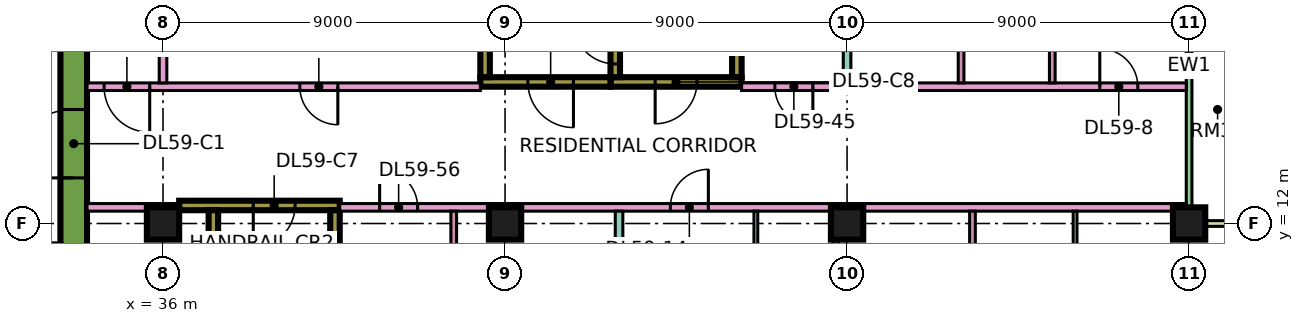
"""IFC4 building model, lengths in metres.
Left out: names, types, materials, properties, quantities, classifications, styles, units other than length and angle.
Written with IfcOpenShell. Run it as: python <this file> out.ifc"""

import sys

from ifc_helpers import new_model, si_unit, direction, frame, frame_2d, origin, origin_2d, place, context, subcontext, project, spatial, rectangle, extrude, element, fill, save


model = new_model("IFC4")
c1 = context("Model", 3, precision=1e-05, world=origin(), true_north=direction((0.0, 1.0)))
c2 = subcontext(c1, "Body", "Model", "MODEL_VIEW")
j1 = project(units=[si_unit("LENGTHUNIT", "METRE"), si_unit("PLANEANGLEUNIT", "RADIAN")], contexts=[c1])
p1 = place(None, origin())
s1 = spatial("IfcSite", under=j1, at=p1, CompositionType="ELEMENT")
p2 = place(p1, origin())
s2 = spatial("IfcBuilding", under=s1, at=p2, CompositionType="ELEMENT")
p3 = place(p2, frame((0.0, 0.0, 249.15)))
s3 = spatial("IfcBuildingStorey", under=s2, at=p3, CompositionType="ELEMENT", Elevation=249.15)
for number, where, z_axis, x_axis in (
    (1, (36.0, 12.0, 0.0), (0.0, 0.0, 1.0), (1.0, 0.0, 0.0)),
    (2, (45.0, 12.0, 0.0), (0.0, 0.0, 1.0), (1.0, 0.0, 0.0)),
    (3, (54.0, 12.0, 0.0), (0.0, 0.0, 1.0), (1.0, 0.0, 0.0)),
    (4, (63.0, 12.0, 0.0), (0.0, 0.0, 1.0), (1.0, 0.0, 0.0)),
):
    element("IfcColumn", number, at=place(p3, frame(where, z_axis=z_axis, x_axis=x_axis)), inside=s3, PredefinedType="COLUMN", context=c2, shape_type="SweptSolid", body=[
        extrude(rectangle(XDim=0.85, YDim=0.85, at=origin_2d()), origin(), (0.0, 0.0, 1.0), 3.75),
    ])
p4 = place(p3, frame((33.65, 7.7, 0.0), z_axis=(0.0, 0.0, 1.0), x_axis=(0.0, 1.0, 0.0)))
e5 = element("IfcWall", 5, at=p4, inside=s3, PredefinedType="SHEAR", context=c2, shape_type="SweptSolid", body=[
    extrude(rectangle(XDim=11.6, YDim=0.7, at=frame_2d((5.8, 0.0))), origin(), (0.0, 0.0, 1.0), 3.75),
])
p5 = place(p4, frame((5.5, 0.0, 0.0)))
e6 = element("IfcOpeningElement", 6, at=p5, cuts=e5, PredefinedType="OPENING", context=c2, shape_type="SweptSolid", body=[
    extrude(rectangle(XDim=1.8, YDim=2.4, at=frame_2d((0.9, 1.2))), frame((0.0, 0.36, 0.0), z_axis=(0.0, -1.0, 0.0), x_axis=(1.0, 0.0, 0.0)), (0.0, 0.0, 1.0), 0.72),
])
p6 = place(p3, frame((36.425, 12.475, 0.0), z_axis=(0.0, 0.0, 1.0), x_axis=(1.0, 0.0, 0.0)))
e7 = element("IfcWall", 7, at=p6, inside=s3, PredefinedType="SHEAR", context=c2, shape_type="SweptSolid", body=[
    extrude(rectangle(XDim=4.225, YDim=0.25, at=frame_2d((2.112, 0.0))), origin(), (0.0, 0.0, 1.0), 3.75),
])
p7 = place(p6, frame((1.95, 0.0, 0.0)))
e8 = element("IfcOpeningElement", 8, at=p7, cuts=e7, PredefinedType="OPENING", context=c2, shape_type="SweptSolid", body=[
    extrude(rectangle(XDim=1.1, YDim=2.2, at=frame_2d((0.55, 1.1))), frame((0.0, 0.135, 0.0), z_axis=(0.0, -1.0, 0.0), x_axis=(1.0, 0.0, 0.0)), (0.0, 0.0, 1.0), 0.27),
])
for number, where, z_axis, x_axis in (
    (9, (37.325, 5.85, 0.0), (0.0, 0.0, 1.0), (0.0, 1.0, 0.0)),
    (10, (40.525, 5.85, 0.0), (0.0, 0.0, 1.0), (0.0, 1.0, 0.0)),
):
    element("IfcWall", number, at=place(p3, frame(where, z_axis=z_axis, x_axis=x_axis)), inside=s3, PredefinedType="SHEAR", context=c2, shape_type="SweptSolid", body=[
        extrude(rectangle(XDim=6.5, YDim=0.25, at=frame_2d((3.25, 0.0))), origin(), (0.0, 0.0, 1.0), 3.75),
    ])
p8 = place(p3, frame((47.775, 15.725, 0.0), z_axis=(0.0, 0.0, 1.0), x_axis=(1.0, 0.0, 0.0)))
e11 = element("IfcWall", 11, at=p8, inside=s3, PredefinedType="SHEAR", context=c2, shape_type="SweptSolid", body=[
    extrude(rectangle(XDim=3.45, YDim=0.25, at=frame_2d((1.725, 0.0))), origin(), (0.0, 0.0, 1.0), 3.75),
])
p9 = place(p8, frame((1.175, 0.0, 0.0)))
e12 = element("IfcOpeningElement", 12, at=p9, cuts=e11, PredefinedType="OPENING", context=c2, shape_type="SweptSolid", body=[
    extrude(rectangle(XDim=1.1, YDim=2.2, at=frame_2d((0.55, 1.1))), frame((0.0, 0.135, 0.0), z_axis=(0.0, -1.0, 0.0), x_axis=(1.0, 0.0, 0.0)), (0.0, 0.0, 1.0), 0.27),
])
p10 = place(p3, frame((47.9, 15.85, 0.0), z_axis=(0.0, 0.0, 1.0), x_axis=(0.0, 1.0, 0.0)))
e13 = element("IfcWall", 13, at=p10, inside=s3, PredefinedType="SHEAR", context=c2, shape_type="SweptSolid", body=[
    extrude(rectangle(XDim=6.5, YDim=0.25, at=frame_2d((3.25, 0.0))), origin(), (0.0, 0.0, 1.0), 3.75),
])
p11 = place(p10, frame((0.35, 0.0, 0.0)))
e14 = element("IfcOpeningElement", 14, at=p11, cuts=e13, PredefinedType="OPENING", context=c2, shape_type="SweptSolid", body=[
    extrude(rectangle(XDim=1.1, YDim=2.2, at=frame_2d((0.55, 1.1))), frame((0.0, 0.135, 0.0), z_axis=(0.0, -1.0, 0.0), x_axis=(1.0, 0.0, 0.0)), (0.0, 0.0, 1.0), 0.27),
])
p12 = place(p3, frame((51.1, 15.85, 0.0), z_axis=(0.0, 0.0, 1.0), x_axis=(0.0, 1.0, 0.0)))
e15 = element("IfcWall", 15, at=p12, inside=s3, PredefinedType="SHEAR", context=c2, shape_type="SweptSolid", body=[
    extrude(rectangle(XDim=6.5, YDim=0.25, at=frame_2d((3.25, 0.0))), origin(), (0.0, 0.0, 1.0), 3.75),
])
p13 = place(p3, frame((44.35, 15.725, 0.0), z_axis=(0.0, 0.0, 1.0), x_axis=(1.0, 0.0, 0.0)))
e16 = element("IfcWall", 16, at=p13, inside=s3, PredefinedType="SHEAR", context=c2, shape_type="SweptSolid", body=[
    extrude(rectangle(XDim=3.425, YDim=0.25, at=frame_2d((1.712, 0.0))), origin(), (0.0, 0.0, 1.0), 3.75),
])
p14 = place(p13, frame((1.25, 0.0, 0.0)))
e17 = element("IfcOpeningElement", 17, at=p14, cuts=e16, PredefinedType="OPENING", context=c2, shape_type="SweptSolid", body=[
    extrude(rectangle(XDim=1.2, YDim=2.2, at=frame_2d((0.6, 1.1))), frame((0.0, 0.135, 0.0), z_axis=(0.0, -1.0, 0.0), x_axis=(1.0, 0.0, 0.0)), (0.0, 0.0, 1.0), 0.27),
])
p15 = place(p3, frame((44.475, 15.85, 0.0), z_axis=(0.0, 0.0, 1.0), x_axis=(0.0, 1.0, 0.0)))
e18 = element("IfcWall", 18, at=p15, inside=s3, PredefinedType="SHEAR", context=c2, shape_type="SweptSolid", body=[
    extrude(rectangle(XDim=6.5, YDim=0.25, at=frame_2d((3.25, 0.0))), origin(), (0.0, 0.0, 1.0), 3.75),
])
p16 = place(p15, frame((1.75, 0.0, 0.0)))
e19 = element("IfcOpeningElement", 19, at=p16, cuts=e18, PredefinedType="OPENING", context=c2, shape_type="SweptSolid", body=[
    extrude(rectangle(XDim=1.1, YDim=2.2, at=frame_2d((0.55, 1.1))), frame((0.0, 0.135, 0.0), z_axis=(0.0, -1.0, 0.0), x_axis=(1.0, 0.0, 0.0)), (0.0, 0.0, 1.0), 0.27),
])
p17 = place(p15, frame((4.3, 0.0, 0.0)))
e20 = element("IfcOpeningElement", 20, at=p17, cuts=e18, PredefinedType="OPENING", context=c2, shape_type="SweptSolid", body=[
    extrude(rectangle(XDim=1.1, YDim=2.2, at=frame_2d((0.55, 1.1))), frame((0.0, 0.135, 0.0), z_axis=(0.0, -1.0, 0.0), x_axis=(1.0, 0.0, 0.0)), (0.0, 0.0, 1.0), 0.27),
])
p18 = place(p3, frame((63.0, 12.075, 0.0), z_axis=(0.0, 0.0, 1.0), x_axis=(0.0, 1.0, 0.0)))
e21 = element("IfcWall", 21, at=p18, inside=s3, PredefinedType="SOLIDWALL", context=c2, shape_type="SweptSolid", body=[
    extrude(rectangle(XDim=10.35, YDim=0.15, at=frame_2d((5.175, 0.0))), origin(), (0.0, 0.0, 1.0), 3.35),
])
p19 = place(p18, frame((4.875, 0.0, 0.0)))
e22 = element("IfcOpeningElement", 22, at=p19, cuts=e21, PredefinedType="OPENING", context=c2, shape_type="SweptSolid", body=[
    extrude(rectangle(XDim=1.8, YDim=2.4, at=frame_2d((0.9, 1.2))), frame((0.0, 0.085, 0.0), z_axis=(0.0, -1.0, 0.0), x_axis=(1.0, 0.0, 0.0)), (0.0, 0.0, 1.0), 0.17),
])
p20 = place(p18, frame((8.587, 0.0, 0.45)))
e23 = element("IfcOpeningElement", 23, at=p20, cuts=e21, PredefinedType="OPENING", context=c2, shape_type="SweptSolid", body=[
    extrude(rectangle(XDim=1.2, YDim=2.4, at=frame_2d((0.6, 1.2))), frame((0.0, 0.085, 0.0), z_axis=(0.0, -1.0, 0.0), x_axis=(1.0, 0.0, 0.0)), (0.0, 0.0, 1.0), 0.17),
])
p21 = place(p3, frame((64.5, 12.0, 0.0), z_axis=(0.0, 0.0, 1.0), x_axis=(-1.0, 0.0, 0.0)))
e24 = element("IfcWall", 24, at=p21, inside=s3, PredefinedType="SOLIDWALL", context=c2, shape_type="SweptSolid", body=[
    extrude(rectangle(XDim=1.5, YDim=0.15, at=frame_2d((0.75, 0.0))), origin(), (0.0, 0.0, 1.0), 3.35),
])
p22 = place(p3, frame((34.0, 12.425, 0.0), z_axis=(0.0, 0.0, 1.0), x_axis=(1.0, 0.0, 0.0)))
e25 = element("IfcWall", 25, at=p22, inside=s3, PredefinedType="PARTITIONING", context=c2, shape_type="SweptSolid", body=[
    extrude(rectangle(XDim=2.426, YDim=0.2, at=frame_2d((1.213, 0.0))), origin(), (0.0, 0.0, 1.0), 3.35),
])
p23 = place(p3, frame((34.0, 15.6, 0.0), z_axis=(0.0, 0.0, 1.0), x_axis=(1.0, 0.0, 0.0)))
e26 = element("IfcWall", 26, at=p23, inside=s3, PredefinedType="PARTITIONING", context=c2, shape_type="SweptSolid", body=[
    extrude(rectangle(XDim=10.35, YDim=0.2, at=frame_2d((5.175, 0.0))), origin(), (0.0, 0.0, 1.0), 3.35),
])
p24 = place(p23, frame((5.6, 0.0, 0.0)))
e27 = element("IfcOpeningElement", 27, at=p24, cuts=e26, PredefinedType="OPENING", context=c2, shape_type="SweptSolid", body=[
    extrude(rectangle(XDim=1.0, YDim=2.1, at=frame_2d((0.5, 1.05))), frame((0.0, 0.11, 0.0), z_axis=(0.0, -1.0, 0.0), x_axis=(1.0, 0.0, 0.0)), (0.0, 0.0, 1.0), 0.22),
])
p25 = place(p23, frame((0.45, 0.0, 0.0)))
e28 = element("IfcOpeningElement", 28, at=p25, cuts=e26, PredefinedType="OPENING", context=c2, shape_type="SweptSolid", body=[
    extrude(rectangle(XDim=1.2, YDim=2.1, at=frame_2d((0.6, 1.05))), frame((0.0, 0.11, 0.0), z_axis=(0.0, -1.0, 0.0), x_axis=(1.0, 0.0, 0.0)), (0.0, 0.0, 1.0), 0.22),
])
p26 = place(p3, frame((36.0, 15.7, 0.0), z_axis=(0.0, 0.0, 1.0), x_axis=(0.0, 1.0, 0.0)))
e29 = element("IfcWall", 29, at=p26, inside=s3, PredefinedType="PARTITIONING", context=c2, shape_type="SweptSolid", body=[
    extrude(rectangle(XDim=8.3, YDim=0.2, at=frame_2d((4.15, 0.0))), origin(), (0.0, 0.0, 1.0), 3.35),
])
p27 = place(p3, frame((40.65, 12.425, 0.0), z_axis=(0.0, 0.0, 1.0), x_axis=(1.0, 0.0, 0.0)))
e30 = element("IfcWall", 30, at=p27, inside=s3, PredefinedType="PARTITIONING", context=c2, shape_type="SweptSolid", body=[
    extrude(rectangle(XDim=22.276, YDim=0.2, at=frame_2d((11.138, 0.0))), origin(), (0.0, 0.0, 1.0), 3.35),
])
p28 = place(p27, frame((8.7, 0.0, 0.0)))
e31 = element("IfcOpeningElement", 31, at=p28, cuts=e30, PredefinedType="OPENING", context=c2, shape_type="SweptSolid", body=[
    extrude(rectangle(XDim=1.0, YDim=2.1, at=frame_2d((0.5, 1.05))), frame((0.0, 0.11, 0.0), z_axis=(0.0, -1.0, 0.0), x_axis=(1.0, 0.0, 0.0)), (0.0, 0.0, 1.0), 0.22),
])
p29 = place(p27, frame((1.05, 0.0, 0.0)))
e32 = element("IfcOpeningElement", 32, at=p29, cuts=e30, PredefinedType="OPENING", context=c2, shape_type="SweptSolid", body=[
    extrude(rectangle(XDim=1.0, YDim=2.1, at=frame_2d((0.5, 1.05))), frame((0.0, 0.11, 0.0), z_axis=(0.0, -1.0, 0.0), x_axis=(1.0, 0.0, 0.0)), (0.0, 0.0, 1.0), 0.22),
])
p30 = place(p3, frame((43.65, 5.825, 0.0), z_axis=(0.0, 0.0, 1.0), x_axis=(0.0, 1.0, 0.0)))
e33 = element("IfcWall", 33, at=p30, inside=s3, PredefinedType="PARTITIONING", context=c2, shape_type="SweptSolid", body=[
    extrude(rectangle(XDim=6.5, YDim=0.15, at=frame_2d((3.25, 0.0))), origin(), (0.0, 0.0, 1.0), 3.35),
])
p31 = place(p30, frame((4.425, 0.0, 0.0)))
e34 = element("IfcOpeningElement", 34, at=p31, cuts=e33, PredefinedType="OPENING", context=c2, shape_type="SweptSolid", body=[
    extrude(rectangle(XDim=0.9, YDim=2.1, at=frame_2d((0.45, 1.05))), frame((0.0, 0.085, 0.0), z_axis=(0.0, -1.0, 0.0), x_axis=(1.0, 0.0, 0.0)), (0.0, 0.0, 1.0), 0.17),
])
p32 = place(p3, frame((48.0, 0.0, 0.0), z_axis=(0.0, 0.0, 1.0), x_axis=(0.0, 1.0, 0.0)))
e35 = element("IfcWall", 35, at=p32, inside=s3, PredefinedType="PARTITIONING", context=c2, shape_type="SweptSolid", body=[
    extrude(rectangle(XDim=12.325, YDim=0.2, at=frame_2d((6.163, 0.0))), origin(), (0.0, 0.0, 1.0), 3.35),
])
p33 = place(p3, frame((51.225, 15.6, 0.0), z_axis=(0.0, 0.0, 1.0), x_axis=(1.0, 0.0, 0.0)))
e36 = element("IfcWall", 36, at=p33, inside=s3, PredefinedType="PARTITIONING", context=c2, shape_type="SweptSolid", body=[
    extrude(rectangle(XDim=11.701, YDim=0.2, at=frame_2d((5.851, 0.0))), origin(), (0.0, 0.0, 1.0), 3.35),
])
p34 = place(p33, frame((9.425, 0.0, 0.0)))
e37 = element("IfcOpeningElement", 37, at=p34, cuts=e36, PredefinedType="OPENING", context=c2, shape_type="SweptSolid", body=[
    extrude(rectangle(XDim=1.0, YDim=2.1, at=frame_2d((0.5, 1.05))), frame((0.0, 0.11, 0.0), z_axis=(0.0, -1.0, 0.0), x_axis=(1.0, 0.0, 0.0)), (0.0, 0.0, 1.0), 0.22),
])
p35 = place(p33, frame((0.875, 0.0, 0.0)))
e38 = element("IfcOpeningElement", 38, at=p35, cuts=e36, PredefinedType="OPENING", context=c2, shape_type="SweptSolid", body=[
    extrude(rectangle(XDim=1.0, YDim=2.1, at=frame_2d((0.5, 1.05))), frame((0.0, 0.11, 0.0), z_axis=(0.0, -1.0, 0.0), x_axis=(1.0, 0.0, 0.0)), (0.0, 0.0, 1.0), 0.22),
])
p36 = place(p3, frame((51.6, 7.7, 0.0), z_axis=(0.0, 0.0, 1.0), x_axis=(0.0, 1.0, 0.0)))
e39 = element("IfcWall", 39, at=p36, inside=s3, PredefinedType="PARTITIONING", context=c2, shape_type="SweptSolid", body=[
    extrude(rectangle(XDim=4.625, YDim=0.1, at=frame_2d((2.312, 0.0))), origin(), (0.0, 0.0, 1.0), 3.35),
])
p37 = place(p36, frame((1.875, 0.0, 0.0)))
e40 = element("IfcOpeningElement", 40, at=p37, cuts=e39, PredefinedType="OPENING", context=c2, shape_type="SweptSolid", body=[
    extrude(rectangle(XDim=0.9, YDim=2.1, at=frame_2d((0.45, 1.05))), frame((0.0, 0.06, 0.0), z_axis=(0.0, -1.0, 0.0), x_axis=(1.0, 0.0, 0.0)), (0.0, 0.0, 1.0), 0.12),
])
p38 = place(p3, frame((53.7, 7.7, 0.0), z_axis=(0.0, 0.0, 1.0), x_axis=(0.0, 1.0, 0.0)))
e41 = element("IfcWall", 41, at=p38, inside=s3, PredefinedType="PARTITIONING", context=c2, shape_type="SweptSolid", body=[
    extrude(rectangle(XDim=4.625, YDim=0.15, at=frame_2d((2.312, 0.0))), origin(), (0.0, 0.0, 1.0), 3.35),
])
p39 = place(p3, frame((54.0, 15.7, 0.0), z_axis=(0.0, 0.0, 1.0), x_axis=(0.0, 1.0, 0.0)))
e42 = element("IfcWall", 42, at=p39, inside=s3, PredefinedType="PARTITIONING", context=c2, shape_type="SweptSolid", body=[
    extrude(rectangle(XDim=8.3, YDim=0.2, at=frame_2d((4.15, 0.0))), origin(), (0.0, 0.0, 1.0), 3.35),
])
p40 = place(p3, frame((57.0, 15.7, 0.0), z_axis=(0.0, 0.0, 1.0), x_axis=(0.0, 1.0, 0.0)))
e43 = element("IfcWall", 43, at=p40, inside=s3, PredefinedType="PARTITIONING", context=c2, shape_type="SweptSolid", body=[
    extrude(rectangle(XDim=3.125, YDim=0.15, at=frame_2d((1.562, 0.0))), origin(), (0.0, 0.0, 1.0), 3.35),
])
p41 = place(p3, frame((57.3, 7.7, 0.0), z_axis=(0.0, 0.0, 1.0), x_axis=(0.0, 1.0, 0.0)))
e44 = element("IfcWall", 44, at=p41, inside=s3, PredefinedType="PARTITIONING", context=c2, shape_type="SweptSolid", body=[
    extrude(rectangle(XDim=4.625, YDim=0.15, at=frame_2d((2.312, 0.0))), origin(), (0.0, 0.0, 1.0), 3.35),
])
p42 = place(p3, frame((59.4, 15.7, 0.0), z_axis=(0.0, 0.0, 1.0), x_axis=(0.0, 1.0, 0.0)))
e45 = element("IfcWall", 45, at=p42, inside=s3, PredefinedType="PARTITIONING", context=c2, shape_type="SweptSolid", body=[
    extrude(rectangle(XDim=3.125, YDim=0.15, at=frame_2d((1.562, 0.0))), origin(), (0.0, 0.0, 1.0), 3.35),
])
p43 = place(p3, frame((60.0, 7.7, 0.0), z_axis=(0.0, 0.0, 1.0), x_axis=(0.0, 1.0, 0.0)))
e46 = element("IfcWall", 46, at=p43, inside=s3, PredefinedType="PARTITIONING", context=c2, shape_type="SweptSolid", body=[
    extrude(rectangle(XDim=4.625, YDim=0.1, at=frame_2d((2.312, 0.0))), origin(), (0.0, 0.0, 1.0), 3.35),
])
p44 = place(p5, origin())
e47 = element("IfcDoor", 47, at=p44, inside=s3, OperationType="DOUBLE_DOOR_SINGLE_SWING", PredefinedType="DOOR", context=c2, shape_type="SweptSolid", body=[
    extrude(rectangle(XDim=1.8, YDim=2.4, at=frame_2d((0.9, 1.2))), frame((0.0, 0.025, 0.0), z_axis=(0.0, -1.0, 0.0), x_axis=(1.0, 0.0, 0.0)), (0.0, 0.0, 1.0), 0.05),
])
fill(e6, e47)
p45 = place(p7, frame((1.1, 0.0, 0.0), z_axis=(0.0, 0.0, 1.0), x_axis=(-1.0, 0.0, 0.0)))
e48 = element("IfcDoor", 48, at=p45, inside=s3, OperationType="SINGLE_SWING_LEFT", PredefinedType="DOOR", context=c2, shape_type="SweptSolid", body=[
    extrude(rectangle(XDim=1.1, YDim=2.2, at=frame_2d((0.55, 1.1))), frame((0.0, 0.025, 0.0), z_axis=(0.0, -1.0, 0.0), x_axis=(1.0, 0.0, 0.0)), (0.0, 0.0, 1.0), 0.05),
])
fill(e8, e48)
p46 = place(p9, frame((1.1, 0.0, 0.0), z_axis=(0.0, 0.0, 1.0), x_axis=(-1.0, 0.0, 0.0)))
e49 = element("IfcDoor", 49, at=p46, inside=s3, OperationType="SINGLE_SWING_LEFT", PredefinedType="DOOR", context=c2, shape_type="SweptSolid", body=[
    extrude(rectangle(XDim=1.1, YDim=2.2, at=frame_2d((0.55, 1.1))), frame((0.0, 0.025, 0.0), z_axis=(0.0, -1.0, 0.0), x_axis=(1.0, 0.0, 0.0)), (0.0, 0.0, 1.0), 0.05),
])
fill(e12, e49)
p47 = place(p14, origin())
e50 = element("IfcDoor", 50, at=p47, inside=s3, OperationType="SINGLE_SWING_RIGHT", PredefinedType="DOOR", context=c2, shape_type="SweptSolid", body=[
    extrude(rectangle(XDim=1.2, YDim=2.2, at=frame_2d((0.6, 1.1))), frame((0.0, 0.025, 0.0), z_axis=(0.0, -1.0, 0.0), x_axis=(1.0, 0.0, 0.0)), (0.0, 0.0, 1.0), 0.05),
])
fill(e17, e50)
p48 = place(p11, frame((1.1, 0.0, 0.0), z_axis=(0.0, 0.0, 1.0), x_axis=(-1.0, 0.0, 0.0)))
e51 = element("IfcDoor", 51, at=p48, inside=s3, OperationType="SINGLE_SWING_RIGHT", PredefinedType="DOOR", context=c2, shape_type="SweptSolid", body=[
    extrude(rectangle(XDim=1.1, YDim=2.2, at=frame_2d((0.55, 1.1))), frame((0.0, 0.025, 0.0), z_axis=(0.0, -1.0, 0.0), x_axis=(1.0, 0.0, 0.0)), (0.0, 0.0, 1.0), 0.05),
])
fill(e14, e51)
p49 = place(p24, origin())
e52 = element("IfcDoor", 52, at=p49, inside=s3, OperationType="SINGLE_SWING_RIGHT", PredefinedType="DOOR", context=c2, shape_type="SweptSolid", body=[
    extrude(rectangle(XDim=1.0, YDim=2.1, at=frame_2d((0.5, 1.05))), frame((0.0, 0.025, 0.0), z_axis=(0.0, -1.0, 0.0), x_axis=(1.0, 0.0, 0.0)), (0.0, 0.0, 1.0), 0.05),
])
fill(e27, e52)
p50 = place(p34, origin())
e53 = element("IfcDoor", 53, at=p50, inside=s3, OperationType="SINGLE_SWING_LEFT", PredefinedType="DOOR", context=c2, shape_type="SweptSolid", body=[
    extrude(rectangle(XDim=1.0, YDim=2.1, at=frame_2d((0.5, 1.05))), frame((0.0, 0.025, 0.0), z_axis=(0.0, -1.0, 0.0), x_axis=(1.0, 0.0, 0.0)), (0.0, 0.0, 1.0), 0.05),
])
fill(e37, e53)
p51 = place(p28, frame((1.0, 0.0, 0.0), z_axis=(0.0, 0.0, 1.0), x_axis=(-1.0, 0.0, 0.0)))
e54 = element("IfcDoor", 54, at=p51, inside=s3, OperationType="SINGLE_SWING_RIGHT", PredefinedType="DOOR", context=c2, shape_type="SweptSolid", body=[
    extrude(rectangle(XDim=1.0, YDim=2.1, at=frame_2d((0.5, 1.05))), frame((0.0, 0.025, 0.0), z_axis=(0.0, -1.0, 0.0), x_axis=(1.0, 0.0, 0.0)), (0.0, 0.0, 1.0), 0.05),
])
fill(e31, e54)
p52 = place(p25, origin())
e55 = element("IfcDoor", 55, at=p52, inside=s3, OperationType="SINGLE_SWING_RIGHT", PredefinedType="DOOR", context=c2, shape_type="SweptSolid", body=[
    extrude(rectangle(XDim=1.2, YDim=2.1, at=frame_2d((0.6, 1.05))), frame((0.0, 0.025, 0.0), z_axis=(0.0, -1.0, 0.0), x_axis=(1.0, 0.0, 0.0)), (0.0, 0.0, 1.0), 0.05),
])
fill(e28, e55)
p53 = place(p35, origin())
e56 = element("IfcDoor", 56, at=p53, inside=s3, OperationType="SINGLE_SWING_RIGHT", PredefinedType="DOOR", context=c2, shape_type="SweptSolid", body=[
    extrude(rectangle(XDim=1.0, YDim=2.1, at=frame_2d((0.5, 1.05))), frame((0.0, 0.025, 0.0), z_axis=(0.0, -1.0, 0.0), x_axis=(1.0, 0.0, 0.0)), (0.0, 0.0, 1.0), 0.05),
])
fill(e38, e56)
p54 = place(p29, origin())
e57 = element("IfcDoor", 57, at=p54, inside=s3, OperationType="SINGLE_SWING_LEFT", PredefinedType="DOOR", context=c2, shape_type="SweptSolid", body=[
    extrude(rectangle(XDim=1.0, YDim=2.1, at=frame_2d((0.5, 1.05))), frame((0.0, 0.025, 0.0), z_axis=(0.0, -1.0, 0.0), x_axis=(1.0, 0.0, 0.0)), (0.0, 0.0, 1.0), 0.05),
])
fill(e32, e57)
save(model, sys.argv[1])
